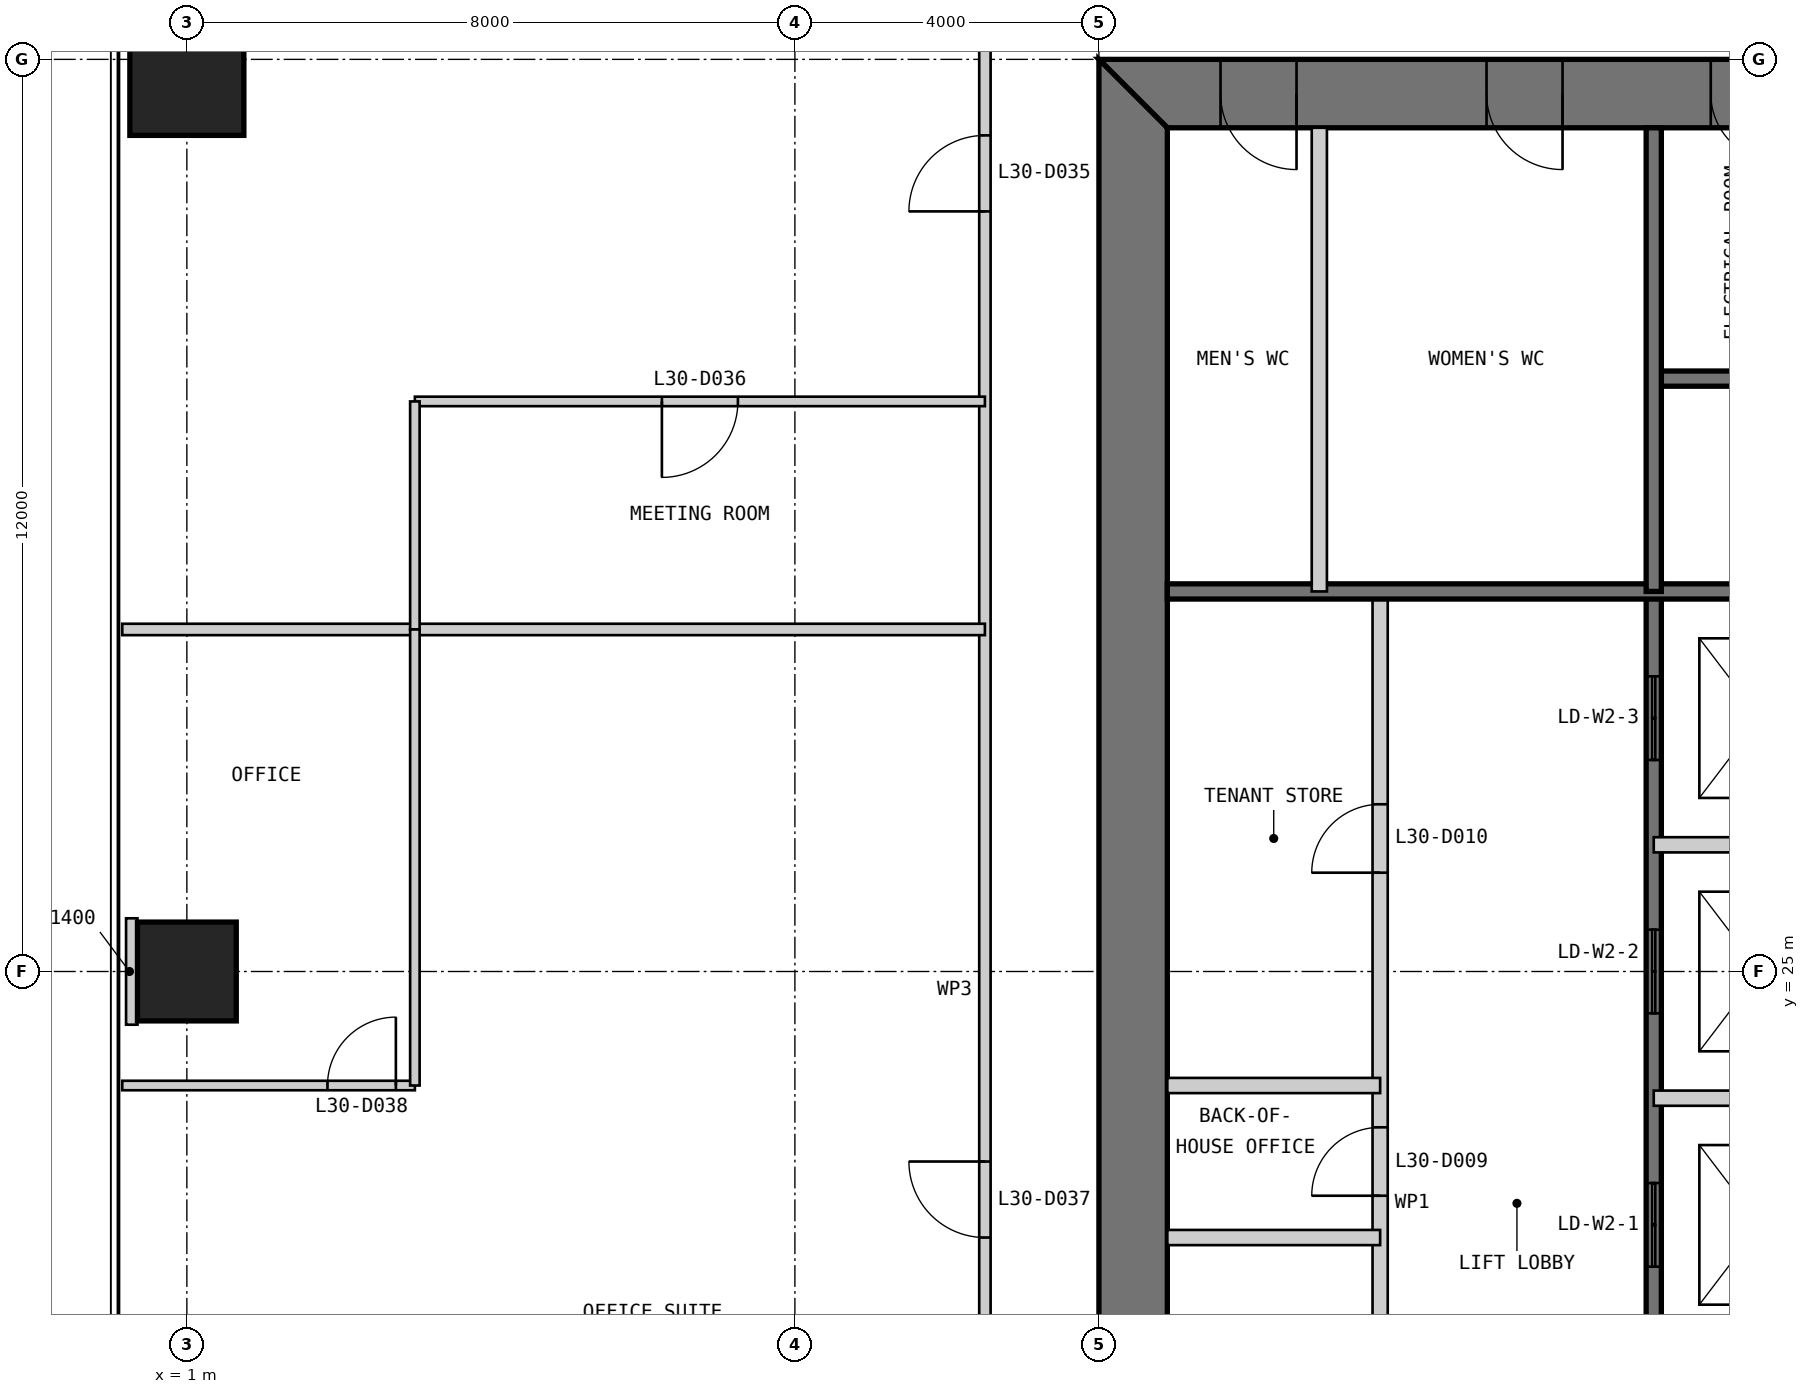
"""IFC4 building model, lengths in metres.
Left out: names, types, materials, properties, quantities, classifications, styles, units other than length and angle.
Written with IfcOpenShell. Run it as: python <this file> out.ifc"""

import sys

from ifc_helpers import new_model, si_unit, direction, frame, frame_2d, origin, origin_2d, place, context, subcontext, project, spatial, polyline, rectangle, outline, extrude, element, fill, save


model = new_model("IFC4")
c1 = context("Model", 3, precision=1e-05, world=origin(), true_north=direction((0.0, 1.0)))
c2 = subcontext(c1, "Body", "Model", "MODEL_VIEW")
j1 = project(units=[si_unit("LENGTHUNIT", "METRE"), si_unit("PLANEANGLEUNIT", "RADIAN")], contexts=[c1])
p1 = place(None, origin())
s1 = spatial("IfcSite", under=j1, at=p1, CompositionType="ELEMENT")
p2 = place(p1, origin())
s2 = spatial("IfcBuilding", under=s1, at=p2, CompositionType="ELEMENT")
p3 = place(p2, frame((0.0, 0.0, 130.4)))
s3 = spatial("IfcBuildingStorey", under=s2, at=p3, CompositionType="ELEMENT", Elevation=130.4)
p4 = place(p3, frame((1.0, 37.0, 0.0), z_axis=(0.0, 0.0, 1.0), x_axis=(1.0, 0.0, 0.0)))
e1 = element("IfcColumn", 1, at=p4, inside=s3, PredefinedType="COLUMN", context=c2, shape_type="SweptSolid", body=[
    extrude(rectangle(XDim=1.5, YDim=2.0, at=origin_2d()), origin(), (0.0, 0.0, 1.0), 4.0),
])
p5 = place(p3, frame((1.0, 25.0, 0.0), z_axis=(0.0, 0.0, 1.0), x_axis=(1.0, 0.0, 0.0)))
e2 = element("IfcColumn", 2, at=p5, inside=s3, PredefinedType="COLUMN", context=c2, shape_type="SweptSolid", body=[
    extrude(rectangle(XDim=1.3, YDim=1.3, at=origin_2d()), origin(), (0.0, 0.0, 1.0), 4.0),
])
p6 = place(p3, frame((37.0, 36.55, 0.0), z_axis=(0.0, 0.0, 1.0), x_axis=(-1.0, 0.0, 0.0)))
e3 = element("IfcWall", 3, at=p6, inside=s3, PredefinedType="SHEAR", context=c2, shape_type="SweptSolid", body=[
    extrude(outline(polyline([(0.0, -0.45), (24.0, -0.45), (23.1, 0.45), (0.9, 0.45), (0.0, -0.45)])), origin(), (0.0, 0.0, 1.0), 4.0),
])
p7 = place(p6, frame((4.9, 0.0, 0.0)))
e4 = element("IfcOpeningElement", 4, at=p7, cuts=e3, PredefinedType="OPENING", context=c2, shape_type="SweptSolid", body=[
    extrude(rectangle(XDim=1.0, YDim=2.2, at=frame_2d((0.5, 1.1))), frame((0.0, 0.46, 0.0), z_axis=(0.0, -1.0, 0.0), x_axis=(1.0, 0.0, 0.0)), (0.0, 0.0, 1.0), 0.92),
])
p8 = place(p6, frame((8.9, 0.0, 0.0)))
e5 = element("IfcOpeningElement", 5, at=p8, cuts=e3, PredefinedType="OPENING", context=c2, shape_type="SweptSolid", body=[
    extrude(rectangle(XDim=1.1, YDim=2.2, at=frame_2d((0.55, 1.1))), frame((0.0, 0.46, 0.0), z_axis=(0.0, -1.0, 0.0), x_axis=(1.0, 0.0, 0.0)), (0.0, 0.0, 1.0), 0.92),
])
p9 = place(p6, frame((15.05, 0.0, 0.0)))
e6 = element("IfcOpeningElement", 6, at=p9, cuts=e3, PredefinedType="OPENING", context=c2, shape_type="SweptSolid", body=[
    extrude(rectangle(XDim=0.9, YDim=2.2, at=frame_2d((0.45, 1.1))), frame((0.0, 0.46, 0.0), z_axis=(0.0, -1.0, 0.0), x_axis=(1.0, 0.0, 0.0)), (0.0, 0.0, 1.0), 0.92),
])
p10 = place(p6, frame((17.9, 0.0, 0.0)))
e7 = element("IfcOpeningElement", 7, at=p10, cuts=e3, PredefinedType="OPENING", context=c2, shape_type="SweptSolid", body=[
    extrude(rectangle(XDim=1.0, YDim=2.2, at=frame_2d((0.5, 1.1))), frame((0.0, 0.46, 0.0), z_axis=(0.0, -1.0, 0.0), x_axis=(1.0, 0.0, 0.0)), (0.0, 0.0, 1.0), 0.92),
])
p11 = place(p6, frame((21.4, 0.0, 0.0)))
e8 = element("IfcOpeningElement", 8, at=p11, cuts=e3, PredefinedType="OPENING", context=c2, shape_type="SweptSolid", body=[
    extrude(rectangle(XDim=1.0, YDim=2.2, at=frame_2d((0.5, 1.1))), frame((0.0, 0.46, 0.0), z_axis=(0.0, -1.0, 0.0), x_axis=(1.0, 0.0, 0.0)), (0.0, 0.0, 1.0), 0.92),
])
p12 = place(p3, frame((13.45, 36.1, 0.0), z_axis=(0.0, 0.0, 1.0), x_axis=(0.0, -1.0, 0.0)))
e9 = element("IfcWall", 9, at=p12, inside=s3, PredefinedType="SHEAR", context=c2, shape_type="SweptSolid", body=[
    extrude(outline(polyline([(-0.9, -0.45), (23.1, -0.45), (22.2, 0.45), (0.0, 0.45), (-0.9, -0.45)])), origin(), (0.0, 0.0, 1.0), 4.0),
])
p13 = place(p12, frame((20.2, 0.0, 0.0)))
e10 = element("IfcOpeningElement", 10, at=p13, cuts=e9, PredefinedType="OPENING", context=c2, shape_type="SweptSolid", body=[
    extrude(rectangle(XDim=1.0, YDim=2.2, at=frame_2d((0.5, 1.1))), frame((0.0, 0.46, 0.0), z_axis=(0.0, -1.0, 0.0), x_axis=(1.0, 0.0, 0.0)), (0.0, 0.0, 1.0), 0.92),
])
p14 = place(p12, frame((17.25, 0.0, 0.0)))
e11 = element("IfcOpeningElement", 11, at=p14, cuts=e9, PredefinedType="OPENING", context=c2, shape_type="SweptSolid", body=[
    extrude(rectangle(XDim=0.9, YDim=2.2, at=frame_2d((0.45, 1.1))), frame((0.0, 0.46, 0.0), z_axis=(0.0, -1.0, 0.0), x_axis=(1.0, 0.0, 0.0)), (0.0, 0.0, 1.0), 0.92),
])
p15 = place(p3, frame((16.7, 13.9, 0.0), z_axis=(0.0, 0.0, 1.0), x_axis=(0.0, 1.0, 0.0)))
e12 = element("IfcWall", 12, at=p15, inside=s3, PredefinedType="PARTITIONING", context=c2, shape_type="SweptSolid", body=[
    extrude(rectangle(XDim=16.1, YDim=0.2, at=frame_2d((8.05, 0.0))), origin(), (0.0, 0.0, 1.0), 3.8),
])
p16 = place(p15, frame((8.15, 0.0, 0.0)))
e13 = element("IfcOpeningElement", 13, at=p16, cuts=e12, PredefinedType="OPENING", context=c2, shape_type="SweptSolid", body=[
    extrude(rectangle(XDim=0.9, YDim=2.2, at=frame_2d((0.45, 1.1))), frame((0.0, 0.11, 0.0), z_axis=(0.0, -1.0, 0.0), x_axis=(1.0, 0.0, 0.0)), (0.0, 0.0, 1.0), 0.22),
])
p17 = place(p15, frame((12.4, 0.0, 0.0)))
e14 = element("IfcOpeningElement", 14, at=p17, cuts=e12, PredefinedType="OPENING", context=c2, shape_type="SweptSolid", body=[
    extrude(rectangle(XDim=0.9, YDim=2.2, at=frame_2d((0.45, 1.1))), frame((0.0, 0.11, 0.0), z_axis=(0.0, -1.0, 0.0), x_axis=(1.0, 0.0, 0.0)), (0.0, 0.0, 1.0), 0.22),
])
p18 = place(p3, frame((20.3, 13.9, 0.0), z_axis=(0.0, 0.0, 1.0), x_axis=(0.0, 1.0, 0.0)))
e15 = element("IfcWall", 15, at=p18, inside=s3, PredefinedType="SOLIDWALL", context=c2, shape_type="SweptSolid", body=[
    extrude(rectangle(XDim=16.1, YDim=0.2, at=frame_2d((8.05, 0.0))), origin(), (0.0, 0.0, 1.0), 3.8),
])
p19 = place(p18, frame((7.217, 0.0, 0.0)))
e16 = element("IfcOpeningElement", 16, at=p19, cuts=e15, PredefinedType="OPENING", context=c2, shape_type="SweptSolid", body=[
    extrude(rectangle(XDim=1.1, YDim=2.2, at=frame_2d((0.55, 1.1))), frame((0.0, 0.11, 0.0), z_axis=(0.0, -1.0, 0.0), x_axis=(1.0, 0.0, 0.0)), (0.0, 0.0, 1.0), 0.22),
])
p20 = place(p18, frame((10.55, 0.0, 0.0)))
e17 = element("IfcOpeningElement", 17, at=p20, cuts=e15, PredefinedType="OPENING", context=c2, shape_type="SweptSolid", body=[
    extrude(rectangle(XDim=1.1, YDim=2.2, at=frame_2d((0.55, 1.1))), frame((0.0, 0.11, 0.0), z_axis=(0.0, -1.0, 0.0), x_axis=(1.0, 0.0, 0.0)), (0.0, 0.0, 1.0), 0.22),
])
p21 = place(p18, frame((13.883, 0.0, 0.0)))
e18 = element("IfcOpeningElement", 18, at=p21, cuts=e15, PredefinedType="OPENING", context=c2, shape_type="SweptSolid", body=[
    extrude(rectangle(XDim=1.1, YDim=2.2, at=frame_2d((0.55, 1.1))), frame((0.0, 0.11, 0.0), z_axis=(0.0, -1.0, 0.0), x_axis=(1.0, 0.0, 0.0)), (0.0, 0.0, 1.0), 0.22),
])
for number, where, z_axis, x_axis in (
    (19, (20.3, 23.333, 0.0), (0.0, 0.0, 1.0), (1.0, 0.0, 0.0)),
    (20, (20.3, 26.667, 0.0), (0.0, 0.0, 1.0), (1.0, 0.0, 0.0)),
    (21, (13.9, 21.5, 0.0), (0.0, 0.0, 1.0), (1.0, 0.0, 0.0)),
    (22, (13.9, 23.5, 0.0), (0.0, 0.0, 1.0), (1.0, 0.0, 0.0)),
):
    element("IfcWall", number, at=place(p3, frame(where, z_axis=z_axis, x_axis=x_axis)), inside=s3, PredefinedType="PARTITIONING", context=c2, shape_type="SweptSolid", body=[
        extrude(rectangle(XDim=2.8, YDim=0.2, at=frame_2d((1.4, 0.0))), origin(), (0.0, 0.0, 1.0), 3.8),
    ])
p22 = place(p3, frame((29.7, 32.8, 0.0), z_axis=(0.0, 0.0, 1.0), x_axis=(-1.0, 0.0, 0.0)))
e23 = element("IfcWall", 23, at=p22, inside=s3, PredefinedType="SOLIDWALL", context=c2, shape_type="SweptSolid", body=[
    extrude(rectangle(XDim=9.4, YDim=0.2, at=frame_2d((4.7, 0.0))), origin(), (0.0, 0.0, 1.0), 3.8),
])
p23 = place(p22, frame((0.25, 0.0, 0.0)))
e24 = element("IfcOpeningElement", 24, at=p23, cuts=e23, PredefinedType="OPENING", context=c2, shape_type="SweptSolid", body=[
    extrude(rectangle(XDim=1.0, YDim=2.2, at=frame_2d((0.5, 1.1))), frame((0.0, 0.11, 0.0), z_axis=(0.0, -1.0, 0.0), x_axis=(1.0, 0.0, 0.0)), (0.0, 0.0, 1.0), 0.22),
])
p24 = place(p3, frame((29.7, 30.0, 0.0), z_axis=(0.0, 0.0, 1.0), x_axis=(-1.0, 0.0, 0.0)))
e25 = element("IfcWall", 25, at=p24, inside=s3, PredefinedType="SOLIDWALL", context=c2, shape_type="SweptSolid", body=[
    extrude(rectangle(XDim=15.8, YDim=0.2, at=frame_2d((7.9, 0.0))), origin(), (0.0, 0.0, 1.0), 3.8),
])
p25 = place(p3, frame((20.3, 36.1, 0.0), z_axis=(0.0, 0.0, 1.0), x_axis=(0.0, -1.0, 0.0)))
e26 = element("IfcWall", 26, at=p25, inside=s3, PredefinedType="SOLIDWALL", context=c2, shape_type="SweptSolid", body=[
    extrude(rectangle(XDim=6.1, YDim=0.2, at=frame_2d((3.05, 0.0))), origin(), (0.0, 0.0, 1.0), 3.8),
])
p26 = place(p3, frame((15.9, 36.1, 0.0), z_axis=(0.0, 0.0, 1.0), x_axis=(0.0, -1.0, 0.0)))
e27 = element("IfcWall", 27, at=p26, inside=s3, PredefinedType="PARTITIONING", context=c2, shape_type="SweptSolid", body=[
    extrude(rectangle(XDim=6.1, YDim=0.2, at=frame_2d((3.05, 0.0))), origin(), (0.0, 0.0, 1.0), 3.8),
])
p27 = place(p3, frame((11.5, 38.5, 0.0), z_axis=(0.0, 0.0, 1.0), x_axis=(0.0, -1.0, 0.0)))
e28 = element("IfcWall", 28, at=p27, inside=s3, PredefinedType="PARTITIONING", context=c2, shape_type="SweptSolid", body=[
    extrude(rectangle(XDim=27.0, YDim=0.15, at=frame_2d((13.5, 0.0))), origin(), (0.0, 0.0, 1.0), 3.85),
])
p28 = place(p27, frame((2.5, 0.0, 0.0)))
e29 = element("IfcOpeningElement", 29, at=p28, cuts=e28, PredefinedType="OPENING", context=c2, shape_type="SweptSolid", body=[
    extrude(rectangle(XDim=1.0, YDim=2.2, at=frame_2d((0.5, 1.1))), frame((0.0, 0.085, 0.0), z_axis=(0.0, -1.0, 0.0), x_axis=(1.0, 0.0, 0.0)), (0.0, 0.0, 1.0), 0.17),
])
p29 = place(p27, frame((16.0, 0.0, 0.0)))
e30 = element("IfcOpeningElement", 30, at=p29, cuts=e28, PredefinedType="OPENING", context=c2, shape_type="SweptSolid", body=[
    extrude(rectangle(XDim=1.0, YDim=2.2, at=frame_2d((0.5, 1.1))), frame((0.0, 0.085, 0.0), z_axis=(0.0, -1.0, 0.0), x_axis=(1.0, 0.0, 0.0)), (0.0, 0.0, 1.0), 0.17),
])
p30 = place(p3, frame((4.0, 32.5, 0.0), z_axis=(0.0, 0.0, 1.0), x_axis=(1.0, 0.0, 0.0)))
e31 = element("IfcWall", 31, at=p30, inside=s3, PredefinedType="PARTITIONING", context=c2, shape_type="SweptSolid", body=[
    extrude(rectangle(XDim=7.5, YDim=0.125, at=frame_2d((3.75, 0.0))), origin(), (0.0, 0.0, 1.0), 3.85),
])
p31 = place(p30, frame((3.25, 0.0, 0.0)))
e32 = element("IfcOpeningElement", 32, at=p31, cuts=e31, PredefinedType="OPENING", context=c2, shape_type="SweptSolid", body=[
    extrude(rectangle(XDim=1.0, YDim=2.2, at=frame_2d((0.5, 1.1))), frame((0.0, 0.073, 0.0), z_axis=(0.0, -1.0, 0.0), x_axis=(1.0, 0.0, 0.0)), (0.0, 0.0, 1.0), 0.145),
])
p32 = place(p3, frame((0.15, 29.5, 0.0), z_axis=(0.0, 0.0, 1.0), x_axis=(1.0, 0.0, 0.0)))
e33 = element("IfcWall", 33, at=p32, inside=s3, PredefinedType="PARTITIONING", context=c2, shape_type="SweptSolid", body=[
    extrude(rectangle(XDim=11.35, YDim=0.15, at=frame_2d((5.675, 0.0))), origin(), (0.0, 0.0, 1.0), 3.85),
])
p33 = place(p3, frame((0.15, 23.5, 0.0), z_axis=(0.0, 0.0, 1.0), x_axis=(1.0, 0.0, 0.0)))
e34 = element("IfcWall", 34, at=p33, inside=s3, PredefinedType="PARTITIONING", context=c2, shape_type="SweptSolid", body=[
    extrude(rectangle(XDim=3.85, YDim=0.125, at=frame_2d((1.925, 0.0))), origin(), (0.0, 0.0, 1.0), 3.85),
])
p34 = place(p33, frame((2.7, 0.0, 0.0)))
e35 = element("IfcOpeningElement", 35, at=p34, cuts=e34, PredefinedType="OPENING", context=c2, shape_type="SweptSolid", body=[
    extrude(rectangle(XDim=0.9, YDim=2.2, at=frame_2d((0.45, 1.1))), frame((0.0, 0.073, 0.0), z_axis=(0.0, -1.0, 0.0), x_axis=(1.0, 0.0, 0.0)), (0.0, 0.0, 1.0), 0.145),
])
p35 = place(p3, frame((4.0, 32.5, 0.0), z_axis=(0.0, 0.0, 1.0), x_axis=(0.0, -1.0, 0.0)))
e36 = element("IfcWall", 36, at=p35, inside=s3, PredefinedType="PARTITIONING", context=c2, shape_type="SweptSolid", body=[
    extrude(rectangle(XDim=3.0, YDim=0.125, at=frame_2d((1.5, 0.0))), origin(), (0.0, 0.0, 1.0), 3.238),
])
p36 = place(p3, frame((4.0, 29.5, 0.0), z_axis=(0.0, 0.0, 1.0), x_axis=(0.0, -1.0, 0.0)))
e37 = element("IfcWall", 37, at=p36, inside=s3, PredefinedType="PARTITIONING", context=c2, shape_type="SweptSolid", body=[
    extrude(rectangle(XDim=6.0, YDim=0.125, at=frame_2d((3.0, 0.0))), origin(), (0.0, 0.0, 1.0), 3.238),
])
p37 = place(p3, frame((0.2, 25.0, 0.0), z_axis=(0.0, 0.0, 1.0), x_axis=(1.0, 0.0, 0.0)))
e38 = element("IfcWall", 38, at=p37, inside=s3, PredefinedType="PARTITIONING", context=c2, shape_type="SweptSolid", body=[
    extrude(rectangle(XDim=0.15, YDim=1.4, at=frame_2d((0.075, 0.0))), origin(), (0.0, 0.0, 1.0), 3.85),
])
p38 = place(p16, origin())
e39 = element("IfcDoor", 39, at=p38, inside=s3, OperationType="SINGLE_SWING_LEFT", PredefinedType="DOOR", context=c2, shape_type="SweptSolid", body=[
    extrude(rectangle(XDim=0.9, YDim=2.2, at=frame_2d((0.45, 1.1))), frame((0.0, 0.025, 0.0), z_axis=(0.0, -1.0, 0.0), x_axis=(1.0, 0.0, 0.0)), (0.0, 0.0, 1.0), 0.05),
])
fill(e13, e39)
p39 = place(p17, origin())
e40 = element("IfcDoor", 40, at=p39, inside=s3, OperationType="SINGLE_SWING_LEFT", PredefinedType="DOOR", context=c2, shape_type="SweptSolid", body=[
    extrude(rectangle(XDim=0.9, YDim=2.2, at=frame_2d((0.45, 1.1))), frame((0.0, 0.025, 0.0), z_axis=(0.0, -1.0, 0.0), x_axis=(1.0, 0.0, 0.0)), (0.0, 0.0, 1.0), 0.05),
])
fill(e14, e40)
p40 = place(p9, origin())
e41 = element("IfcDoor", 41, at=p40, inside=s3, OperationType="SINGLE_SWING_LEFT", PredefinedType="DOOR", context=c2, shape_type="SweptSolid", body=[
    extrude(rectangle(XDim=0.9, YDim=2.2, at=frame_2d((0.45, 1.1))), frame((0.0, 0.025, 0.0), z_axis=(0.0, -1.0, 0.0), x_axis=(1.0, 0.0, 0.0)), (0.0, 0.0, 1.0), 0.05),
    extrude(outline(polyline([(0.0, 0.0), (0.04, 0.0), (0.04, 2.16), (0.86, 2.16), (0.86, 0.0), (0.9, 0.0), (0.9, 2.2), (0.0, 2.2), (0.0, 0.0)])), frame((0.0, 0.3, 0.0), z_axis=(0.0, -1.0, 0.0), x_axis=(1.0, 0.0, 0.0)), (0.0, 0.0, 1.0), 0.6),
])
fill(e6, e41)
p41 = place(p10, origin())
e42 = element("IfcDoor", 42, at=p41, inside=s3, OperationType="SINGLE_SWING_LEFT", PredefinedType="DOOR", context=c2, shape_type="SweptSolid", body=[
    extrude(rectangle(XDim=1.0, YDim=2.2, at=frame_2d((0.5, 1.1))), frame((0.0, 0.025, 0.0), z_axis=(0.0, -1.0, 0.0), x_axis=(1.0, 0.0, 0.0)), (0.0, 0.0, 1.0), 0.05),
    extrude(outline(polyline([(0.0, 0.0), (0.04, 0.0), (0.04, 2.16), (0.96, 2.16), (0.96, 0.0), (1.0, 0.0), (1.0, 2.2), (0.0, 2.2), (0.0, 0.0)])), frame((0.0, 0.3, 0.0), z_axis=(0.0, -1.0, 0.0), x_axis=(1.0, 0.0, 0.0)), (0.0, 0.0, 1.0), 0.6),
])
fill(e7, e42)
p42 = place(p11, origin())
e43 = element("IfcDoor", 43, at=p42, inside=s3, OperationType="SINGLE_SWING_LEFT", PredefinedType="DOOR", context=c2, shape_type="SweptSolid", body=[
    extrude(rectangle(XDim=1.0, YDim=2.2, at=frame_2d((0.5, 1.1))), frame((0.0, 0.025, 0.0), z_axis=(0.0, -1.0, 0.0), x_axis=(1.0, 0.0, 0.0)), (0.0, 0.0, 1.0), 0.05),
    extrude(outline(polyline([(0.0, 0.0), (0.04, 0.0), (0.04, 2.16), (0.96, 2.16), (0.96, 0.0), (1.0, 0.0), (1.0, 2.2), (0.0, 2.2), (0.0, 0.0)])), frame((0.0, 0.3, 0.0), z_axis=(0.0, -1.0, 0.0), x_axis=(1.0, 0.0, 0.0)), (0.0, 0.0, 1.0), 0.6),
])
fill(e8, e43)
p43 = place(p28, frame((1.0, 0.0, 0.0), z_axis=(0.0, 0.0, 1.0), x_axis=(-1.0, 0.0, 0.0)))
e44 = element("IfcDoor", 44, at=p43, inside=s3, OperationType="SINGLE_SWING_LEFT", PredefinedType="DOOR", context=c2, shape_type="SweptSolid", body=[
    extrude(rectangle(XDim=1.0, YDim=2.2, at=frame_2d((0.5, 1.1))), frame((0.0, 0.025, 0.0), z_axis=(0.0, -1.0, 0.0), x_axis=(1.0, 0.0, 0.0)), (0.0, 0.0, 1.0), 0.05),
])
fill(e29, e44)
p44 = place(p31, frame((1.0, 0.0, 0.0), z_axis=(0.0, 0.0, 1.0), x_axis=(-1.0, 0.0, 0.0)))
e45 = element("IfcDoor", 45, at=p44, inside=s3, OperationType="SINGLE_SWING_RIGHT", PredefinedType="DOOR", context=c2, shape_type="SweptSolid", body=[
    extrude(rectangle(XDim=1.0, YDim=2.2, at=frame_2d((0.5, 1.1))), frame((0.0, 0.025, 0.0), z_axis=(0.0, -1.0, 0.0), x_axis=(1.0, 0.0, 0.0)), (0.0, 0.0, 1.0), 0.05),
])
fill(e32, e45)
p45 = place(p29, frame((1.0, 0.0, 0.0), z_axis=(0.0, 0.0, 1.0), x_axis=(-1.0, 0.0, 0.0)))
e46 = element("IfcDoor", 46, at=p45, inside=s3, OperationType="SINGLE_SWING_RIGHT", PredefinedType="DOOR", context=c2, shape_type="SweptSolid", body=[
    extrude(rectangle(XDim=1.0, YDim=2.2, at=frame_2d((0.5, 1.1))), frame((0.0, 0.025, 0.0), z_axis=(0.0, -1.0, 0.0), x_axis=(1.0, 0.0, 0.0)), (0.0, 0.0, 1.0), 0.05),
])
fill(e30, e46)
p46 = place(p34, origin())
e47 = element("IfcDoor", 47, at=p46, inside=s3, OperationType="SINGLE_SWING_RIGHT", PredefinedType="DOOR", context=c2, shape_type="SweptSolid", body=[
    extrude(rectangle(XDim=0.9, YDim=2.2, at=frame_2d((0.45, 1.1))), frame((0.0, 0.025, 0.0), z_axis=(0.0, -1.0, 0.0), x_axis=(1.0, 0.0, 0.0)), (0.0, 0.0, 1.0), 0.05),
])
fill(e35, e47)
p47 = place(p19, origin())
e48 = element("IfcDoor", 48, at=p47, inside=s3, OperationType="DOUBLE_DOOR_SLIDING", PredefinedType="DOOR", context=c2, shape_type="SweptSolid", body=[
    extrude(rectangle(XDim=1.1, YDim=2.2, at=frame_2d((0.55, 1.1))), frame((0.0, 0.025, 0.0), z_axis=(0.0, -1.0, 0.0), x_axis=(1.0, 0.0, 0.0)), (0.0, 0.0, 1.0), 0.05),
])
fill(e16, e48)
p48 = place(p20, origin())
e49 = element("IfcDoor", 49, at=p48, inside=s3, OperationType="DOUBLE_DOOR_SLIDING", PredefinedType="DOOR", context=c2, shape_type="SweptSolid", body=[
    extrude(rectangle(XDim=1.1, YDim=2.2, at=frame_2d((0.55, 1.1))), frame((0.0, 0.025, 0.0), z_axis=(0.0, -1.0, 0.0), x_axis=(1.0, 0.0, 0.0)), (0.0, 0.0, 1.0), 0.05),
])
fill(e17, e49)
p49 = place(p21, origin())
e50 = element("IfcDoor", 50, at=p49, inside=s3, OperationType="DOUBLE_DOOR_SLIDING", PredefinedType="DOOR", context=c2, shape_type="SweptSolid", body=[
    extrude(rectangle(XDim=1.1, YDim=2.2, at=frame_2d((0.55, 1.1))), frame((0.0, 0.025, 0.0), z_axis=(0.0, -1.0, 0.0), x_axis=(1.0, 0.0, 0.0)), (0.0, 0.0, 1.0), 0.05),
])
fill(e18, e50)
save(model, sys.argv[1])
